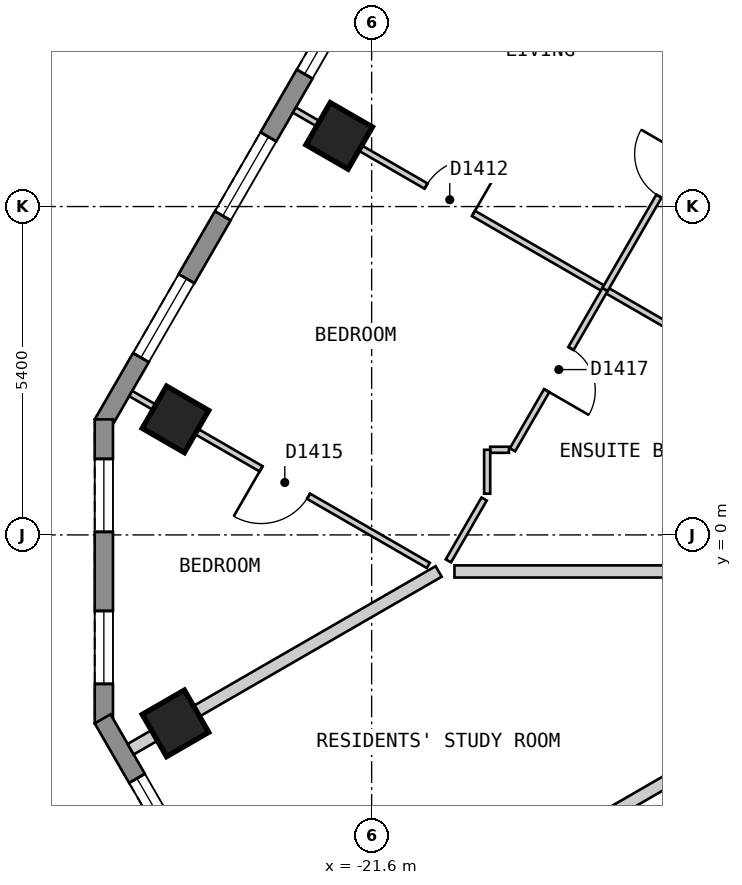
"""IFC4 building model, lengths in metres.
Left out: names, types, materials, properties, quantities, classifications, styles, units other than length and angle.
Written with IfcOpenShell. Run it as: python <this file> out.ifc"""

import sys

from ifc_helpers import new_model, si_unit, direction, frame, frame_2d, origin, origin_2d, place, context, subcontext, project, spatial, polyline, rectangle, outline, extrude, element, fill, save


model = new_model("IFC4")
c1 = context("Model", 3, precision=1e-05, world=origin(), true_north=direction((0.0, 1.0)))
c2 = subcontext(c1, "Body", "Model", "MODEL_VIEW")
j1 = project(units=[si_unit("LENGTHUNIT", "METRE"), si_unit("PLANEANGLEUNIT", "RADIAN")], contexts=[c1])
p1 = place(None, origin())
s1 = spatial("IfcSite", under=j1, at=p1, CompositionType="ELEMENT")
p2 = place(p1, origin())
s2 = spatial("IfcBuilding", under=s1, at=p2, CompositionType="ELEMENT")
p3 = place(p2, frame((0.0, 0.0, 178.2)))
s3 = spatial("IfcBuildingStorey", under=s2, at=p3, CompositionType="ELEMENT", Elevation=178.2)
for number, where, z_axis, x_axis in (
    (1, (-22.134, 6.562, 0.0), (0.0, 0.0, 1.0), (-0.5, -0.866, 0.0)),
    (2, (-24.826, 1.9, 0.0), (0.0, 0.0, 1.0), (-0.5, -0.866, 0.0)),
    (3, (-24.826, -3.099, 0.0), (0.0, 0.0, 1.0), (0.5, -0.866, 0.0)),
):
    element("IfcColumn", number, at=place(p3, frame(where, z_axis=z_axis, x_axis=x_axis)), inside=s3, PredefinedType="COLUMN", context=c2, shape_type="SweptSolid", body=[
        extrude(rectangle(XDim=0.8, YDim=0.8, at=origin_2d()), origin(), (0.0, 0.0, 1.0), 3.0),
    ])
p4 = place(p3, frame((-14.592, 21.625, 0.0), z_axis=(0.0, 0.0, 1.0), x_axis=(-0.500010537973, -0.866019319597, 0.0)))
e4 = element("IfcWall", 4, at=p4, inside=s3, PredefinedType="SOLIDWALL", context=c2, shape_type="SweptSolid", body=[
    extrude(outline(polyline([(0.0, -0.15), (22.863, -0.15), (22.783, 0.15), (0.08, 0.15), (0.0, -0.15)])), origin(), (0.0, 0.0, 1.0), 2.7),
])
p5 = place(p4, frame((1.259, 0.0, 0.15)))
e5 = element("IfcOpeningElement", 5, at=p5, cuts=e4, PredefinedType="OPENING", context=c2, shape_type="SweptSolid", body=[
    extrude(rectangle(XDim=1.5, YDim=2.1, at=frame_2d((0.75, 1.05))), frame((0.0, 0.16, 0.0), z_axis=(0.0, -1.0, 0.0), x_axis=(1.0, 0.0, 0.0)), (0.0, 0.0, 1.0), 0.32),
])
p6 = place(p4, frame((3.952, 0.0, 0.15)))
e6 = element("IfcOpeningElement", 6, at=p6, cuts=e4, PredefinedType="OPENING", context=c2, shape_type="SweptSolid", body=[
    extrude(rectangle(XDim=1.5, YDim=2.1, at=frame_2d((0.75, 1.05))), frame((0.0, 0.16, 0.0), z_axis=(0.0, -1.0, 0.0), x_axis=(1.0, 0.0, 0.0)), (0.0, 0.0, 1.0), 0.32),
])
p7 = place(p4, frame((6.644, 0.0, 0.15)))
e7 = element("IfcOpeningElement", 7, at=p7, cuts=e4, PredefinedType="OPENING", context=c2, shape_type="SweptSolid", body=[
    extrude(rectangle(XDim=1.5, YDim=2.1, at=frame_2d((0.75, 1.05))), frame((0.0, 0.16, 0.0), z_axis=(0.0, -1.0, 0.0), x_axis=(1.0, 0.0, 0.0)), (0.0, 0.0, 1.0), 0.32),
])
p8 = place(p4, frame((9.335, 0.0, 0.15)))
e8 = element("IfcOpeningElement", 8, at=p8, cuts=e4, PredefinedType="OPENING", context=c2, shape_type="SweptSolid", body=[
    extrude(rectangle(XDim=1.5, YDim=2.1, at=frame_2d((0.75, 1.05))), frame((0.0, 0.16, 0.0), z_axis=(0.0, -1.0, 0.0), x_axis=(1.0, 0.0, 0.0)), (0.0, 0.0, 1.0), 0.32),
])
p9 = place(p4, frame((12.028, 0.0, 0.15)))
e9 = element("IfcOpeningElement", 9, at=p9, cuts=e4, PredefinedType="OPENING", context=c2, shape_type="SweptSolid", body=[
    extrude(rectangle(XDim=1.5, YDim=2.1, at=frame_2d((0.75, 1.05))), frame((0.0, 0.16, 0.0), z_axis=(0.0, -1.0, 0.0), x_axis=(1.0, 0.0, 0.0)), (0.0, 0.0, 1.0), 0.32),
])
p10 = place(p4, frame((14.72, 0.0, 0.15)))
e10 = element("IfcOpeningElement", 10, at=p10, cuts=e4, PredefinedType="OPENING", context=c2, shape_type="SweptSolid", body=[
    extrude(rectangle(XDim=1.5, YDim=2.1, at=frame_2d((0.75, 1.05))), frame((0.0, 0.16, 0.0), z_axis=(0.0, -1.0, 0.0), x_axis=(1.0, 0.0, 0.0)), (0.0, 0.0, 1.0), 0.32),
])
p11 = place(p4, frame((17.411, 0.0, 0.15)))
e11 = element("IfcOpeningElement", 11, at=p11, cuts=e4, PredefinedType="OPENING", context=c2, shape_type="SweptSolid", body=[
    extrude(rectangle(XDim=1.5, YDim=2.1, at=frame_2d((0.75, 1.05))), frame((0.0, 0.16, 0.0), z_axis=(0.0, -1.0, 0.0), x_axis=(1.0, 0.0, 0.0)), (0.0, 0.0, 1.0), 0.32),
])
p12 = place(p4, frame((20.104, 0.0, 0.15)))
e12 = element("IfcOpeningElement", 12, at=p12, cuts=e4, PredefinedType="OPENING", context=c2, shape_type="SweptSolid", body=[
    extrude(rectangle(XDim=1.5, YDim=2.1, at=frame_2d((0.75, 1.05))), frame((0.0, 0.16, 0.0), z_axis=(0.0, -1.0, 0.0), x_axis=(1.0, 0.0, 0.0)), (0.0, 0.0, 1.0), 0.32),
])
p13 = place(p3, frame((-26.004, 1.9, 0.0), z_axis=(0.0, 0.0, 1.0), x_axis=(0.0, -1.0, 0.0)))
e13 = element("IfcWall", 13, at=p13, inside=s3, PredefinedType="SOLIDWALL", context=c2, shape_type="SweptSolid", body=[
    extrude(outline(polyline([(0.0, -0.15), (5.0, -0.15), (4.92, 0.15), (0.08, 0.15), (0.0, -0.15)])), origin(), (0.0, 0.0, 1.0), 2.7),
])
p14 = place(p13, frame((0.65, 0.0, 0.15)))
e14 = element("IfcOpeningElement", 14, at=p14, cuts=e13, PredefinedType="OPENING", context=c2, shape_type="SweptSolid", body=[
    extrude(rectangle(XDim=1.2, YDim=2.1, at=frame_2d((0.6, 1.05))), frame((0.0, 0.16, 0.0), z_axis=(0.0, -1.0, 0.0), x_axis=(1.0, 0.0, 0.0)), (0.0, 0.0, 1.0), 0.32),
])
p15 = place(p13, frame((3.15, 0.0, 0.15)))
e15 = element("IfcOpeningElement", 15, at=p15, cuts=e13, PredefinedType="OPENING", context=c2, shape_type="SweptSolid", body=[
    extrude(rectangle(XDim=1.2, YDim=2.1, at=frame_2d((0.6, 1.05))), frame((0.0, 0.16, 0.0), z_axis=(0.0, -1.0, 0.0), x_axis=(1.0, 0.0, 0.0)), (0.0, 0.0, 1.0), 0.32),
])
p16 = place(p3, frame((-26.024, -3.025, 0.0), z_axis=(0.0, 0.0, 1.0), x_axis=(0.500018670445, -0.86601462413, 0.0)))
e16 = element("IfcWall", 16, at=p16, inside=s3, PredefinedType="SOLIDWALL", context=c2, shape_type="SweptSolid", body=[
    extrude(outline(polyline([(0.0, -0.15), (20.785, -0.15), (20.705, 0.15), (0.08, 0.15), (0.0, -0.15)])), origin(), (0.0, 0.0, 1.0), 2.7),
])
p17 = place(p16, frame((1.13, 0.0, 0.15)))
e17 = element("IfcOpeningElement", 17, at=p17, cuts=e16, PredefinedType="OPENING", context=c2, shape_type="SweptSolid", body=[
    extrude(rectangle(XDim=1.5, YDim=2.1, at=frame_2d((0.75, 1.05))), frame((0.0, 0.16, 0.0), z_axis=(0.0, -1.0, 0.0), x_axis=(1.0, 0.0, 0.0)), (0.0, 0.0, 1.0), 0.32),
])
p18 = place(p16, frame((3.562, 0.0, 0.15)))
e18 = element("IfcOpeningElement", 18, at=p18, cuts=e16, PredefinedType="OPENING", context=c2, shape_type="SweptSolid", body=[
    extrude(rectangle(XDim=1.5, YDim=2.1, at=frame_2d((0.75, 1.05))), frame((0.0, 0.16, 0.0), z_axis=(0.0, -1.0, 0.0), x_axis=(1.0, 0.0, 0.0)), (0.0, 0.0, 1.0), 0.32),
])
p19 = place(p16, frame((5.994, 0.0, 0.15)))
e19 = element("IfcOpeningElement", 19, at=p19, cuts=e16, PredefinedType="OPENING", context=c2, shape_type="SweptSolid", body=[
    extrude(rectangle(XDim=1.5, YDim=2.1, at=frame_2d((0.75, 1.05))), frame((0.0, 0.16, 0.0), z_axis=(0.0, -1.0, 0.0), x_axis=(1.0, 0.0, 0.0)), (0.0, 0.0, 1.0), 0.32),
])
p20 = place(p16, frame((8.425, 0.0, 0.15)))
e20 = element("IfcOpeningElement", 20, at=p20, cuts=e16, PredefinedType="OPENING", context=c2, shape_type="SweptSolid", body=[
    extrude(rectangle(XDim=1.5, YDim=2.1, at=frame_2d((0.75, 1.05))), frame((0.0, 0.16, 0.0), z_axis=(0.0, -1.0, 0.0), x_axis=(1.0, 0.0, 0.0)), (0.0, 0.0, 1.0), 0.32),
])
p21 = place(p16, frame((10.857, 0.0, 0.15)))
e21 = element("IfcOpeningElement", 21, at=p21, cuts=e16, PredefinedType="OPENING", context=c2, shape_type="SweptSolid", body=[
    extrude(rectangle(XDim=1.5, YDim=2.1, at=frame_2d((0.75, 1.05))), frame((0.0, 0.16, 0.0), z_axis=(0.0, -1.0, 0.0), x_axis=(1.0, 0.0, 0.0)), (0.0, 0.0, 1.0), 0.32),
])
p22 = place(p16, frame((13.289, 0.0, 0.15)))
e22 = element("IfcOpeningElement", 22, at=p22, cuts=e16, PredefinedType="OPENING", context=c2, shape_type="SweptSolid", body=[
    extrude(rectangle(XDim=1.5, YDim=2.1, at=frame_2d((0.75, 1.05))), frame((0.0, 0.16, 0.0), z_axis=(0.0, -1.0, 0.0), x_axis=(1.0, 0.0, 0.0)), (0.0, 0.0, 1.0), 0.32),
])
p23 = place(p16, frame((15.722, 0.0, 0.15)))
e23 = element("IfcOpeningElement", 23, at=p23, cuts=e16, PredefinedType="OPENING", context=c2, shape_type="SweptSolid", body=[
    extrude(rectangle(XDim=1.5, YDim=2.1, at=frame_2d((0.75, 1.05))), frame((0.0, 0.16, 0.0), z_axis=(0.0, -1.0, 0.0), x_axis=(1.0, 0.0, 0.0)), (0.0, 0.0, 1.0), 0.32),
])
p24 = place(p16, frame((18.154, 0.0, 0.15)))
e24 = element("IfcOpeningElement", 24, at=p24, cuts=e16, PredefinedType="OPENING", context=c2, shape_type="SweptSolid", body=[
    extrude(rectangle(XDim=1.5, YDim=2.1, at=frame_2d((0.75, 1.05))), frame((0.0, 0.16, 0.0), z_axis=(0.0, -1.0, 0.0), x_axis=(1.0, 0.0, 0.0)), (0.0, 0.0, 1.0), 0.32),
])
p25 = place(p3, frame((-22.87, 6.987, 0.0), z_axis=(0.0, 0.0, 1.0), x_axis=(0.866022959057, -0.500004234368, 0.0)))
e25 = element("IfcWall", 25, at=p25, inside=s3, PredefinedType="PARTITIONING", context=c2, shape_type="SweptSolid", body=[
    extrude(rectangle(XDim=10.0, YDim=0.1, at=frame_2d((5.0, 0.0))), origin(), (0.0, 0.0, 1.0), 2.7),
])
p26 = place(p25, frame((2.5, 0.0, 0.0)))
e26 = element("IfcOpeningElement", 26, at=p26, cuts=e25, PredefinedType="OPENING", context=c2, shape_type="SweptSolid", body=[
    extrude(rectangle(XDim=0.9, YDim=2.1, at=frame_2d((0.45, 1.05))), frame((0.0, 0.06, 0.0), z_axis=(0.0, -1.0, 0.0), x_axis=(1.0, 0.0, 0.0)), (0.0, 0.0, 1.0), 0.12),
])
p27 = place(p3, frame((-25.562, 2.325, 0.0), z_axis=(0.0, 0.0, 1.0), x_axis=(0.865998530728, -0.500046542611, 0.0)))
e27 = element("IfcWall", 27, at=p27, inside=s3, PredefinedType="PARTITIONING", context=c2, shape_type="SweptSolid", body=[
    extrude(rectangle(XDim=5.651, YDim=0.1, at=frame_2d((2.826, 0.0))), origin(), (0.0, 0.0, 1.0), 2.7),
])
p28 = place(p27, frame((2.476, 0.0, 0.0)))
e28 = element("IfcOpeningElement", 28, at=p28, cuts=e27, PredefinedType="OPENING", context=c2, shape_type="SweptSolid", body=[
    extrude(rectangle(XDim=0.9, YDim=2.1, at=frame_2d((0.45, 1.05))), frame((0.0, 0.06, 0.0), z_axis=(0.0, -1.0, 0.0), x_axis=(1.0, 0.0, 0.0)), (0.0, 0.0, 1.0), 0.12),
])
p29 = place(p3, frame((-19.65, 1.4, 0.0), z_axis=(0.0, 0.0, 1.0), x_axis=(1.0, 0.0, 0.0)))
e29 = element("IfcWall", 29, at=p29, inside=s3, PredefinedType="PARTITIONING", context=c2, shape_type="SweptSolid", body=[
    extrude(rectangle(XDim=0.309, YDim=0.1, at=frame_2d((0.154, 0.0))), origin(), (0.0, 0.0, 1.0), 2.7),
])
p30 = place(p3, frame((-20.338, -0.427, 0.0), z_axis=(0.0, 0.0, 1.0), x_axis=(0.500069990121, 0.865984991198, 0.0)))
e30 = element("IfcWall", 30, at=p30, inside=s3, PredefinedType="PARTITIONING", context=c2, shape_type="SweptSolid", body=[
    extrude(rectangle(XDim=1.176, YDim=0.1, at=frame_2d((0.588, 0.0))), origin(), (0.0, 0.0, 1.0), 2.7),
])
p31 = place(p3, frame((-19.283, 1.4, 0.0), z_axis=(0.0, 0.0, 1.0), x_axis=(0.499847391584, 0.866113494368, 0.0)))
e31 = element("IfcWall", 31, at=p31, inside=s3, PredefinedType="PARTITIONING", context=c2, shape_type="SweptSolid", body=[
    extrude(rectangle(XDim=3.045, YDim=0.1, at=frame_2d((1.522, 0.0))), origin(), (0.0, 0.0, 1.0), 2.7),
])
p32 = place(p31, frame((1.123, 0.0, 0.0)))
e32 = element("IfcOpeningElement", 32, at=p32, cuts=e31, PredefinedType="OPENING", context=c2, shape_type="SweptSolid", body=[
    extrude(rectangle(XDim=0.8, YDim=2.1, at=frame_2d((0.4, 1.05))), frame((0.0, 0.06, 0.0), z_axis=(0.0, -1.0, 0.0), x_axis=(1.0, 0.0, 0.0)), (0.0, 0.0, 1.0), 0.12),
])
p33 = place(p3, frame((-19.7, 0.678, 0.0), z_axis=(0.0, 0.0, 1.0), x_axis=(0.0, 1.0, 0.0)))
e33 = element("IfcWall", 33, at=p33, inside=s3, PredefinedType="PARTITIONING", context=c2, shape_type="SweptSolid", body=[
    extrude(rectangle(XDim=0.722, YDim=0.1, at=frame_2d((0.361, 0.0))), origin(), (0.0, 0.0, 1.0), 2.7),
])
p34 = place(p3, frame((-20.238, -0.601, 0.0), z_axis=(0.0, 0.0, 1.0), x_axis=(1.0, 0.0, 0.0)))
e34 = element("IfcWall", 34, at=p34, inside=s3, PredefinedType="PARTITIONING", context=c2, shape_type="SweptSolid", body=[
    extrude(rectangle(XDim=4.65, YDim=0.2, at=frame_2d((2.325, 0.0))), origin(), (0.0, 0.0, 1.0), 2.7),
])
p35 = place(p3, frame((-23.13, -7.737, 0.0), z_axis=(0.0, 0.0, 1.0), x_axis=(0.86598451299, 0.500070818246, 0.0)))
e35 = element("IfcWall", 35, at=p35, inside=s3, PredefinedType="PARTITIONING", context=c2, shape_type="SweptSolid", body=[
    extrude(rectangle(XDim=8.695, YDim=0.2, at=frame_2d((4.348, 0.0))), origin(), (0.0, 0.0, 1.0), 2.7),
])
p36 = place(p3, frame((-25.563, -3.524, 0.0), z_axis=(0.0, 0.0, 1.0), x_axis=(0.866128586522, 0.499821239653, 0.0)))
e36 = element("IfcWall", 36, at=p36, inside=s3, PredefinedType="PARTITIONING", context=c2, shape_type="SweptSolid", body=[
    extrude(rectangle(XDim=5.848, YDim=0.2, at=frame_2d((2.924, 0.0))), origin(), (0.0, 0.0, 1.0), 2.7),
])
p37 = place(p3, frame((-17.761, 4.037, 0.0), z_axis=(0.0, 0.0, 1.0), x_axis=(0.50009692756, 0.865969435399, 0.0)))
e37 = element("IfcWall", 37, at=p37, inside=s3, PredefinedType="PARTITIONING", context=c2, shape_type="SweptSolid", body=[
    extrude(rectangle(XDim=4.345, YDim=0.1, at=frame_2d((2.173, 0.0))), origin(), (0.0, 0.0, 1.0), 2.7),
])
p38 = place(p37, frame((1.772, 0.0, 0.0)))
e38 = element("IfcOpeningElement", 38, at=p38, cuts=e37, PredefinedType="OPENING", context=c2, shape_type="SweptSolid", body=[
    extrude(rectangle(XDim=0.8, YDim=2.1, at=frame_2d((0.4, 1.05))), frame((0.0, 0.06, 0.0), z_axis=(0.0, -1.0, 0.0), x_axis=(1.0, 0.0, 0.0)), (0.0, 0.0, 1.0), 0.12),
])
p39 = place(p10, origin())
e39 = element("IfcWindow", 39, at=p39, inside=s3, PartitioningType="SINGLE_PANEL", PredefinedType="WINDOW", context=c2, shape_type="SweptSolid", body=[
    extrude(rectangle(XDim=1.5, YDim=2.1, at=frame_2d((0.75, 1.05))), frame((0.0, 0.03, 0.0), z_axis=(0.0, -1.0, 0.0), x_axis=(1.0, 0.0, 0.0)), (0.0, 0.0, 1.0), 0.06),
])
fill(e10, e39)
p40 = place(p11, origin())
e40 = element("IfcWindow", 40, at=p40, inside=s3, PartitioningType="SINGLE_PANEL", PredefinedType="WINDOW", context=c2, shape_type="SweptSolid", body=[
    extrude(rectangle(XDim=1.5, YDim=2.1, at=frame_2d((0.75, 1.05))), frame((0.0, 0.03, 0.0), z_axis=(0.0, -1.0, 0.0), x_axis=(1.0, 0.0, 0.0)), (0.0, 0.0, 1.0), 0.06),
])
fill(e11, e40)
p41 = place(p12, origin())
e41 = element("IfcWindow", 41, at=p41, inside=s3, PartitioningType="SINGLE_PANEL", PredefinedType="WINDOW", context=c2, shape_type="SweptSolid", body=[
    extrude(rectangle(XDim=1.5, YDim=2.1, at=frame_2d((0.75, 1.05))), frame((0.0, 0.03, 0.0), z_axis=(0.0, -1.0, 0.0), x_axis=(1.0, 0.0, 0.0)), (0.0, 0.0, 1.0), 0.06),
])
fill(e12, e41)
p42 = place(p14, origin())
e42 = element("IfcWindow", 42, at=p42, inside=s3, PartitioningType="SINGLE_PANEL", PredefinedType="WINDOW", context=c2, shape_type="SweptSolid", body=[
    extrude(rectangle(XDim=1.2, YDim=2.1, at=frame_2d((0.6, 1.05))), frame((0.0, 0.03, 0.0), z_axis=(0.0, -1.0, 0.0), x_axis=(1.0, 0.0, 0.0)), (0.0, 0.0, 1.0), 0.06),
])
fill(e14, e42)
p43 = place(p15, origin())
e43 = element("IfcWindow", 43, at=p43, inside=s3, PartitioningType="SINGLE_PANEL", PredefinedType="WINDOW", context=c2, shape_type="SweptSolid", body=[
    extrude(rectangle(XDim=1.2, YDim=2.1, at=frame_2d((0.6, 1.05))), frame((0.0, 0.03, 0.0), z_axis=(0.0, -1.0, 0.0), x_axis=(1.0, 0.0, 0.0)), (0.0, 0.0, 1.0), 0.06),
])
fill(e15, e43)
p44 = place(p17, origin())
e44 = element("IfcWindow", 44, at=p44, inside=s3, PartitioningType="SINGLE_PANEL", PredefinedType="WINDOW", context=c2, shape_type="SweptSolid", body=[
    extrude(rectangle(XDim=1.5, YDim=2.1, at=frame_2d((0.75, 1.05))), frame((0.0, 0.03, 0.0), z_axis=(0.0, -1.0, 0.0), x_axis=(1.0, 0.0, 0.0)), (0.0, 0.0, 1.0), 0.06),
])
fill(e17, e44)
p45 = place(p26, origin())
e45 = element("IfcDoor", 45, at=p45, inside=s3, OperationType="SINGLE_SWING_RIGHT", PredefinedType="DOOR", context=c2, shape_type="SweptSolid", body=[
    extrude(rectangle(XDim=0.9, YDim=2.1, at=frame_2d((0.45, 1.05))), frame((0.0, 0.025, 0.0), z_axis=(0.0, -1.0, 0.0), x_axis=(1.0, 0.0, 0.0)), (0.0, 0.0, 1.0), 0.05),
])
fill(e26, e45)
p46 = place(p38, origin())
e46 = element("IfcDoor", 46, at=p46, inside=s3, OperationType="SINGLE_SWING_RIGHT", PredefinedType="DOOR", context=c2, shape_type="SweptSolid", body=[
    extrude(rectangle(XDim=0.8, YDim=2.1, at=frame_2d((0.4, 1.05))), frame((0.0, 0.025, 0.0), z_axis=(0.0, -1.0, 0.0), x_axis=(1.0, 0.0, 0.0)), (0.0, 0.0, 1.0), 0.05),
])
fill(e38, e46)
p47 = place(p28, origin())
e47 = element("IfcDoor", 47, at=p47, inside=s3, OperationType="SINGLE_SWING_LEFT", PredefinedType="DOOR", context=c2, shape_type="SweptSolid", body=[
    extrude(rectangle(XDim=0.9, YDim=2.1, at=frame_2d((0.45, 1.05))), frame((0.0, 0.025, 0.0), z_axis=(0.0, -1.0, 0.0), x_axis=(1.0, 0.0, 0.0)), (0.0, 0.0, 1.0), 0.05),
])
fill(e28, e47)
p48 = place(p32, origin())
e48 = element("IfcDoor", 48, at=p48, inside=s3, OperationType="SINGLE_SWING_LEFT", PredefinedType="DOOR", context=c2, shape_type="SweptSolid", body=[
    extrude(rectangle(XDim=0.8, YDim=2.1, at=frame_2d((0.4, 1.05))), frame((0.0, 0.025, 0.0), z_axis=(0.0, -1.0, 0.0), x_axis=(1.0, 0.0, 0.0)), (0.0, 0.0, 1.0), 0.05),
])
fill(e32, e48)
save(model, sys.argv[1])
